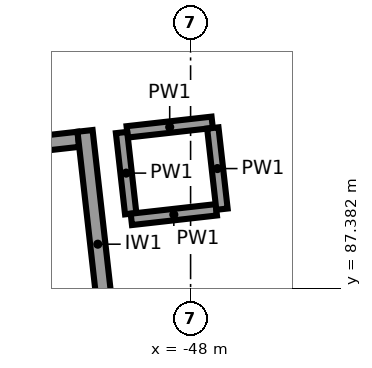
"""IFC4 building model, lengths in metres.
Left out: names, types, materials, properties, quantities, classifications, styles, units other than length and angle.
Written with IfcOpenShell. Run it as: python <this file> out.ifc"""

import sys

from ifc_helpers import new_model, si_unit, direction, frame, frame_2d, origin, place, context, subcontext, project, spatial, rectangle, extrude, element, save


model = new_model("IFC4")
c1 = context("Model", 3, precision=1e-05, world=origin(), true_north=direction((0.0, 1.0)))
c2 = subcontext(c1, "Body", "Model", "MODEL_VIEW")
j1 = project(units=[si_unit("LENGTHUNIT", "METRE"), si_unit("PLANEANGLEUNIT", "RADIAN")], contexts=[c1])
p1 = place(None, origin())
s1 = spatial("IfcSite", under=j1, at=p1, CompositionType="ELEMENT")
p2 = place(p1, origin())
s2 = spatial("IfcBuilding", under=s1, at=p2, CompositionType="ELEMENT")
p3 = place(p2, frame((0.0, 0.0, 12.0)))
s3 = spatial("IfcBuildingStorey", under=s2, at=p3, CompositionType="ELEMENT", Elevation=12.0)
p4 = place(p3, frame((-49.389, 89.454, 0.0), z_axis=(0.0, 0.0, 1.0), x_axis=(0.111976588553, -0.993710845073, 0.0)))
e1 = element("IfcWall", 1, at=p4, inside=s3, PredefinedType="SHEAR", context=c2, shape_type="SweptSolid", body=[
    extrude(rectangle(XDim=3.0, YDim=0.2, at=frame_2d((1.5, 0.0))), origin(), (0.0, 0.0, 1.0), 5.65),
])
p5 = place(p3, frame((-49.477, 89.343, 0.0), z_axis=(0.0, 0.0, 1.0), x_axis=(-0.993718105662, -0.11191213732, 0.0)))
e2 = element("IfcWall", 2, at=p5, inside=s3, PredefinedType="SHEAR", context=c2, shape_type="SweptSolid", body=[
    extrude(rectangle(XDim=1.9, YDim=0.2, at=frame_2d((0.95, 0.0))), origin(), (0.0, 0.0, 1.0), 5.65),
])
p6 = place(p3, frame((-47.716, 89.567, 0.0), z_axis=(0.0, 0.0, 1.0), x_axis=(-0.993710504932, -0.11197960702, 0.0)))
e3 = element("IfcWall", 3, at=p6, inside=s3, PredefinedType="PARTITIONING", context=c2, shape_type="SweptSolid", body=[
    extrude(rectangle(XDim=1.125, YDim=0.15, at=frame_2d((0.562, 0.0))), origin(), (0.0, 0.0, 1.0), 5.65),
])
p7 = place(p3, frame((-48.908, 89.432, 0.0), z_axis=(0.0, 0.0, 1.0), x_axis=(0.111951742856, -0.993713644503, 0.0)))
e4 = element("IfcWall", 4, at=p7, inside=s3, PredefinedType="PARTITIONING", context=c2, shape_type="SweptSolid", body=[
    extrude(rectangle(XDim=1.075, YDim=0.15, at=frame_2d((0.538, 0.0))), origin(), (0.0, 0.0, 1.0), 5.65),
])
p8 = place(p3, frame((-48.78, 88.29, 0.0), z_axis=(0.0, 0.0, 1.0), x_axis=(0.993710504932, 0.11197960702, 0.0)))
e5 = element("IfcWall", 5, at=p8, inside=s3, PredefinedType="PARTITIONING", context=c2, shape_type="SweptSolid", body=[
    extrude(rectangle(XDim=1.125, YDim=0.15, at=frame_2d((0.562, 0.0))), origin(), (0.0, 0.0, 1.0), 5.65),
])
p9 = place(p3, frame((-47.587, 88.424, 0.0), z_axis=(0.0, 0.0, 1.0), x_axis=(-0.111951742856, 0.993713644503, 0.0)))
e6 = element("IfcWall", 6, at=p9, inside=s3, PredefinedType="PARTITIONING", context=c2, shape_type="SweptSolid", body=[
    extrude(rectangle(XDim=1.075, YDim=0.15, at=frame_2d((0.538, 0.0))), origin(), (0.0, 0.0, 1.0), 5.65),
])
save(model, sys.argv[1])
